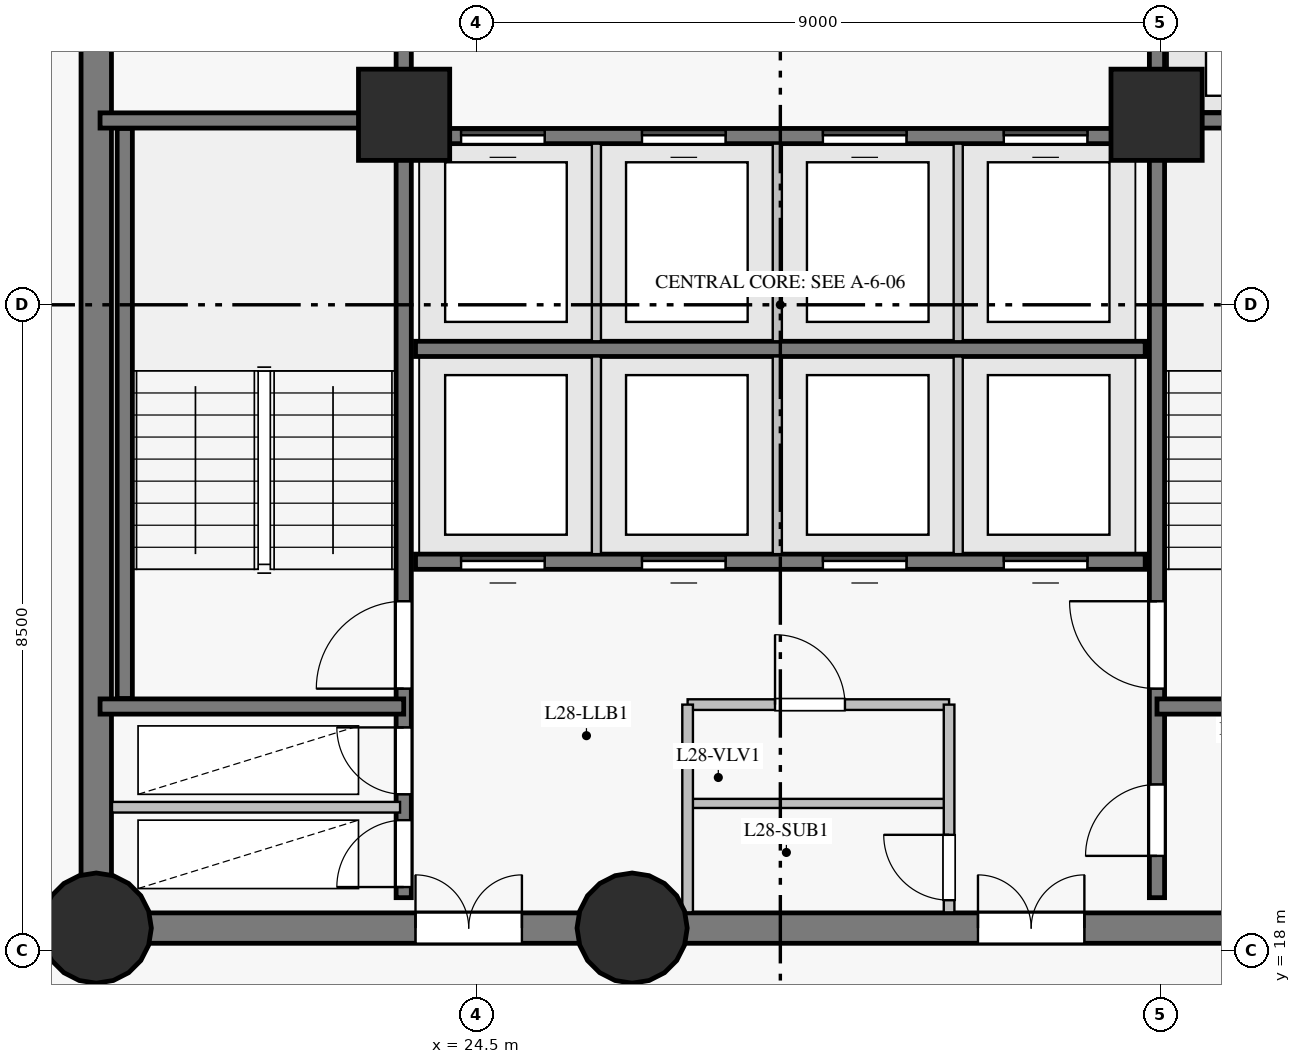
"""IFC4 building model, lengths in metres.
Left out: names, types, materials, properties, quantities, classifications, styles, units other than length and angle.
Written with IfcOpenShell. Run it as: python <this file> out.ifc"""

import sys

from ifc_helpers import new_model, si_unit, direction, frame, frame_2d, origin, origin_with_axes, origin_2d, place, context, subcontext, project, spatial, rectangle, circle, extrude, source, transform, mapped, element, fill, save


model = new_model("IFC4")
c1 = context("Model", 3, precision=1e-05, world=origin(), true_north=direction((0.0, 1.0)))
c2 = subcontext(c1, "Body", "Model", "MODEL_VIEW")
j1 = project(units=[si_unit("LENGTHUNIT", "METRE"), si_unit("PLANEANGLEUNIT", "RADIAN")], contexts=[c1])
p1 = place(None, origin())
s1 = spatial("IfcSite", under=j1, at=p1, CompositionType="ELEMENT")
p2 = place(p1, origin())
s2 = spatial("IfcBuilding", under=s1, at=p2, CompositionType="ELEMENT")
p3 = place(p2, frame((0.0, 0.0, 105.35)))
s3 = spatial("IfcBuildingStorey", under=s2, at=p3, CompositionType="ELEMENT", Elevation=105.35)
p4 = place(p3, frame((19.5, 18.3, 0.0), z_axis=(0.0, 0.0, 1.0), x_axis=(1.0, 0.0, 0.0)))
e1 = element("IfcWall", 1, at=p4, inside=s3, PredefinedType="SHEAR", context=c2, shape_type="SweptSolid", body=[
    extrude(rectangle(XDim=7.05, YDim=0.4, at=frame_2d((3.525, 0.0))), origin(), (0.0, 0.0, 1.0), 2.825),
])
p5 = place(p4, frame((4.2, 0.0, 0.0)))
e2 = element("IfcOpeningElement", 2, at=p5, cuts=e1, PredefinedType="OPENING", context=c2, shape_type="SweptSolid", body=[
    extrude(rectangle(XDim=1.4, YDim=2.2, at=frame_2d((0.7, 1.1))), frame((0.0, 0.21, 0.0), z_axis=(0.0, -1.0, 0.0), x_axis=(1.0, 0.0, 0.0)), (0.0, 0.0, 1.0), 0.42),
])
p6 = place(p3, frame((26.55, 18.3, 0.0), z_axis=(0.0, 0.0, 1.0), x_axis=(1.0, 0.0, 0.0)))
e3 = element("IfcWall", 3, at=p6, inside=s3, PredefinedType="SHEAR", context=c2, shape_type="SweptSolid", body=[
    extrude(rectangle(XDim=10.95, YDim=0.4, at=frame_2d((5.475, 0.0))), origin(), (0.0, 0.0, 1.0), 2.825),
])
p7 = place(p6, frame((4.55, 0.0, 0.0)))
e4 = element("IfcOpeningElement", 4, at=p7, cuts=e3, PredefinedType="OPENING", context=c2, shape_type="SweptSolid", body=[
    extrude(rectangle(XDim=1.4, YDim=2.2, at=frame_2d((0.7, 1.1))), frame((0.0, 0.21, 0.0), z_axis=(0.0, -1.0, 0.0), x_axis=(1.0, 0.0, 0.0)), (0.0, 0.0, 1.0), 0.42),
])
p8 = place(p3, frame((19.5, 34.7, 0.0), z_axis=(0.0, 0.0, 1.0), x_axis=(0.0, -1.0, 0.0)))
e5 = element("IfcWall", 5, at=p8, inside=s3, PredefinedType="SHEAR", context=c2, shape_type="SweptSolid", body=[
    extrude(rectangle(XDim=16.4, YDim=0.4, at=frame_2d((8.2, 0.0))), origin(), (0.0, 0.0, 1.0), 2.825),
])
p9 = place(p8, frame((3.1, 0.0, 0.0)))
e6 = element("IfcOpeningElement", 6, at=p9, cuts=e5, PredefinedType="OPENING", context=c2, shape_type="SweptSolid", body=[
    extrude(rectangle(XDim=1.1, YDim=2.15, at=frame_2d((0.55, 1.075))), frame((0.0, 0.21, 0.0), z_axis=(0.0, -1.0, 0.0), x_axis=(1.0, 0.0, 0.0)), (0.0, 0.0, 1.0), 0.42),
])
m1 = source(origin_with_axes(), c2, "Body", "SweptSolid", [
    extrude(circle(Radius=0.725, at=origin_2d()), origin(), (0.0, 0.0, 1.0), 3.05),
])
for number, where, z_axis, x_axis in (
    (7, (19.5, 18.3, 0.0), (0.0, 0.0, 1.0), (1.0, 0.0, 0.0)),
    (8, (26.55, 18.3, 0.0), (0.0, 0.0, 1.0), (1.0, 0.0, 0.0)),
):
    element("IfcColumn", number, at=place(p3, frame(where, z_axis=z_axis, x_axis=x_axis)), inside=s3, PredefinedType="COLUMN", context=c2, shape_type="MappedRepresentation", body=[
        mapped(m1, transform((0.0, 0.0, 0.0), scale=1.0)),
    ])
m2 = source(origin_with_axes(), c2, "Body", "SweptSolid", [
    extrude(rectangle(XDim=1.2, YDim=1.2, at=origin_2d()), origin(), (0.0, 0.0, 1.0), 3.05),
])
for number, where, z_axis, x_axis in (
    (9, (23.55, 29.0, 0.0), (0.0, 0.0, 1.0), (1.0, 0.0, 0.0)),
    (10, (33.45, 29.0, 0.0), (0.0, 0.0, 1.0), (1.0, 0.0, 0.0)),
):
    element("IfcColumn", number, at=place(p3, frame(where, z_axis=z_axis, x_axis=x_axis)), inside=s3, PredefinedType="COLUMN", context=c2, shape_type="MappedRepresentation", body=[
        mapped(m2, transform((0.0, 0.0, 0.0), scale=1.0)),
    ])
p10 = place(p3, frame((23.545, 18.7, 0.0), z_axis=(0.0, 0.0, 1.0), x_axis=(0.0, 1.0, 0.0)))
e11 = element("IfcWall", 11, at=p10, inside=s3, PredefinedType="SHEAR", context=c2, shape_type="SweptSolid", body=[
    extrude(rectangle(XDim=15.6, YDim=0.2, at=frame_2d((7.8, 0.0))), origin(), (0.0, 0.0, 1.0), 2.825),
])
p11 = place(p10, frame((2.75, 0.0, 0.0)))
e12 = element("IfcOpeningElement", 12, at=p11, cuts=e11, PredefinedType="OPENING", context=c2, shape_type="SweptSolid", body=[
    extrude(rectangle(XDim=1.15, YDim=2.15, at=frame_2d((0.575, 1.075))), frame((0.0, 0.11, 0.0), z_axis=(0.0, -1.0, 0.0), x_axis=(1.0, 0.0, 0.0)), (0.0, 0.0, 1.0), 0.22),
])
p12 = place(p10, frame((0.14, 0.0, 0.0)))
e13 = element("IfcOpeningElement", 13, at=p12, cuts=e11, PredefinedType="OPENING", context=c2, shape_type="SweptSolid", body=[
    extrude(rectangle(XDim=0.88, YDim=2.1, at=frame_2d((0.44, 1.05))), frame((0.0, 0.11, 0.0), z_axis=(0.0, -1.0, 0.0), x_axis=(1.0, 0.0, 0.0)), (0.0, 0.0, 1.0), 0.22),
])
p13 = place(p10, frame((1.36, 0.0, 0.0)))
e14 = element("IfcOpeningElement", 14, at=p13, cuts=e11, PredefinedType="OPENING", context=c2, shape_type="SweptSolid", body=[
    extrude(rectangle(XDim=0.88, YDim=2.1, at=frame_2d((0.44, 1.05))), frame((0.0, 0.11, 0.0), z_axis=(0.0, -1.0, 0.0), x_axis=(1.0, 0.0, 0.0)), (0.0, 0.0, 1.0), 0.22),
])
p14 = place(p10, frame((12.1, 0.0, 0.0)))
e15 = element("IfcOpeningElement", 15, at=p14, cuts=e11, PredefinedType="OPENING", context=c2, shape_type="SweptSolid", body=[
    extrude(rectangle(XDim=1.12, YDim=2.15, at=frame_2d((0.56, 1.075))), frame((0.0, 0.11, 0.0), z_axis=(0.0, -1.0, 0.0), x_axis=(1.0, 0.0, 0.0)), (0.0, 0.0, 1.0), 0.22),
])
p15 = place(p10, frame((14.05, 0.0, 0.0)))
e16 = element("IfcOpeningElement", 16, at=p15, cuts=e11, PredefinedType="OPENING", context=c2, shape_type="SweptSolid", body=[
    extrude(rectangle(XDim=1.12, YDim=2.15, at=frame_2d((0.56, 1.075))), frame((0.0, 0.11, 0.0), z_axis=(0.0, -1.0, 0.0), x_axis=(1.0, 0.0, 0.0)), (0.0, 0.0, 1.0), 0.22),
])
p16 = place(p3, frame((33.455, 18.7, 0.0), z_axis=(0.0, 0.0, 1.0), x_axis=(0.0, 1.0, 0.0)))
e17 = element("IfcWall", 17, at=p16, inside=s3, PredefinedType="SHEAR", context=c2, shape_type="SweptSolid", body=[
    extrude(rectangle(XDim=15.6, YDim=0.2, at=frame_2d((7.8, 0.0))), origin(), (0.0, 0.0, 1.0), 2.825),
])
p17 = place(p16, frame((2.75, 0.0, 0.0)))
e18 = element("IfcOpeningElement", 18, at=p17, cuts=e17, PredefinedType="OPENING", context=c2, shape_type="SweptSolid", body=[
    extrude(rectangle(XDim=1.15, YDim=2.15, at=frame_2d((0.575, 1.075))), frame((0.0, 0.11, 0.0), z_axis=(0.0, -1.0, 0.0), x_axis=(1.0, 0.0, 0.0)), (0.0, 0.0, 1.0), 0.22),
])
p18 = place(p16, frame((0.55, 0.0, 0.0)))
e19 = element("IfcOpeningElement", 19, at=p18, cuts=e17, PredefinedType="OPENING", context=c2, shape_type="SweptSolid", body=[
    extrude(rectangle(XDim=0.94, YDim=2.1, at=frame_2d((0.47, 1.05))), frame((0.0, 0.11, 0.0), z_axis=(0.0, -1.0, 0.0), x_axis=(1.0, 0.0, 0.0)), (0.0, 0.0, 1.0), 0.22),
])
p19 = place(p3, frame((23.7, 23.12, 0.0), z_axis=(0.0, 0.0, 1.0), x_axis=(1.0, 0.0, 0.0)))
e20 = element("IfcWall", 20, at=p19, inside=s3, PredefinedType="SHEAR", context=c2, shape_type="SweptSolid", body=[
    extrude(rectangle(XDim=9.6, YDim=0.2, at=frame_2d((4.8, 0.0))), origin(), (0.0, 0.0, 1.0), 2.825),
])
p20 = place(p19, frame((0.6, 0.0, 0.0)))
e21 = element("IfcOpeningElement", 21, at=p20, cuts=e20, PredefinedType="OPENING", context=c2, shape_type="SweptSolid", body=[
    extrude(rectangle(XDim=1.1, YDim=2.15, at=frame_2d((0.55, 1.075))), frame((0.0, 0.11, 0.0), z_axis=(0.0, -1.0, 0.0), x_axis=(1.0, 0.0, 0.0)), (0.0, 0.0, 1.0), 0.22),
])
p21 = place(p19, frame((2.98, 0.0, 0.0)))
e22 = element("IfcOpeningElement", 22, at=p21, cuts=e20, PredefinedType="OPENING", context=c2, shape_type="SweptSolid", body=[
    extrude(rectangle(XDim=1.1, YDim=2.15, at=frame_2d((0.55, 1.075))), frame((0.0, 0.11, 0.0), z_axis=(0.0, -1.0, 0.0), x_axis=(1.0, 0.0, 0.0)), (0.0, 0.0, 1.0), 0.22),
])
p22 = place(p19, frame((5.36, 0.0, 0.0)))
e23 = element("IfcOpeningElement", 23, at=p22, cuts=e20, PredefinedType="OPENING", context=c2, shape_type="SweptSolid", body=[
    extrude(rectangle(XDim=1.1, YDim=2.15, at=frame_2d((0.55, 1.075))), frame((0.0, 0.11, 0.0), z_axis=(0.0, -1.0, 0.0), x_axis=(1.0, 0.0, 0.0)), (0.0, 0.0, 1.0), 0.22),
])
p23 = place(p19, frame((7.74, 0.0, 0.0)))
e24 = element("IfcOpeningElement", 24, at=p23, cuts=e20, PredefinedType="OPENING", context=c2, shape_type="SweptSolid", body=[
    extrude(rectangle(XDim=1.1, YDim=2.15, at=frame_2d((0.55, 1.075))), frame((0.0, 0.11, 0.0), z_axis=(0.0, -1.0, 0.0), x_axis=(1.0, 0.0, 0.0)), (0.0, 0.0, 1.0), 0.22),
])
p24 = place(p3, frame((23.7, 25.92, 0.0), z_axis=(0.0, 0.0, 1.0), x_axis=(1.0, 0.0, 0.0)))
e25 = element("IfcWall", 25, at=p24, inside=s3, PredefinedType="SHEAR", context=c2, shape_type="SweptSolid", body=[
    extrude(rectangle(XDim=9.6, YDim=0.2, at=frame_2d((4.8, 0.0))), origin(), (0.0, 0.0, 1.0), 2.825),
])
p25 = place(p3, frame((23.7, 28.72, 0.0), z_axis=(0.0, 0.0, 1.0), x_axis=(1.0, 0.0, 0.0)))
e26 = element("IfcWall", 26, at=p25, inside=s3, PredefinedType="SHEAR", context=c2, shape_type="SweptSolid", body=[
    extrude(rectangle(XDim=9.6, YDim=0.2, at=frame_2d((4.8, 0.0))), origin(), (0.0, 0.0, 1.0), 2.825),
])
p26 = place(p25, frame((0.6, 0.0, 0.0)))
e27 = element("IfcOpeningElement", 27, at=p26, cuts=e26, PredefinedType="OPENING", context=c2, shape_type="SweptSolid", body=[
    extrude(rectangle(XDim=1.1, YDim=2.15, at=frame_2d((0.55, 1.075))), frame((0.0, 0.11, 0.0), z_axis=(0.0, -1.0, 0.0), x_axis=(1.0, 0.0, 0.0)), (0.0, 0.0, 1.0), 0.22),
])
p27 = place(p25, frame((2.98, 0.0, 0.0)))
e28 = element("IfcOpeningElement", 28, at=p27, cuts=e26, PredefinedType="OPENING", context=c2, shape_type="SweptSolid", body=[
    extrude(rectangle(XDim=1.1, YDim=2.15, at=frame_2d((0.55, 1.075))), frame((0.0, 0.11, 0.0), z_axis=(0.0, -1.0, 0.0), x_axis=(1.0, 0.0, 0.0)), (0.0, 0.0, 1.0), 0.22),
])
p28 = place(p25, frame((5.36, 0.0, 0.0)))
e29 = element("IfcOpeningElement", 29, at=p28, cuts=e26, PredefinedType="OPENING", context=c2, shape_type="SweptSolid", body=[
    extrude(rectangle(XDim=1.1, YDim=2.15, at=frame_2d((0.55, 1.075))), frame((0.0, 0.11, 0.0), z_axis=(0.0, -1.0, 0.0), x_axis=(1.0, 0.0, 0.0)), (0.0, 0.0, 1.0), 0.22),
])
p29 = place(p25, frame((7.74, 0.0, 0.0)))
e30 = element("IfcOpeningElement", 30, at=p29, cuts=e26, PredefinedType="OPENING", context=c2, shape_type="SweptSolid", body=[
    extrude(rectangle(XDim=1.1, YDim=2.15, at=frame_2d((0.55, 1.075))), frame((0.0, 0.11, 0.0), z_axis=(0.0, -1.0, 0.0), x_axis=(1.0, 0.0, 0.0)), (0.0, 0.0, 1.0), 0.22),
])
p30 = place(p3, frame((19.875, 21.32, 0.0), z_axis=(0.0, 0.0, 1.0), x_axis=(0.0, 1.0, 0.0)))
e31 = element("IfcWall", 31, at=p30, inside=s3, PredefinedType="SHEAR", context=c2, shape_type="SweptSolid", body=[
    extrude(rectangle(XDim=7.5, YDim=0.2, at=frame_2d((3.75, 0.0))), origin(), (0.0, 0.0, 1.0), 2.825),
])
for number, where, z_axis, x_axis in (
    (32, (33.455, 21.215, 0.0), (0.0, 0.0, 1.0), (1.0, 0.0, 0.0)),
    (33, (33.455, 28.925, 0.0), (0.0, 0.0, 1.0), (1.0, 0.0, 0.0)),
    (34, (19.55, 21.215, 0.0), (0.0, 0.0, 1.0), (1.0, 0.0, 0.0)),
    (35, (19.55, 28.925, 0.0), (0.0, 0.0, 1.0), (1.0, 0.0, 0.0)),
):
    element("IfcWall", number, at=place(p3, frame(where, z_axis=z_axis, x_axis=x_axis)), inside=s3, PredefinedType="SHEAR", context=c2, shape_type="SweptSolid", body=[
        extrude(rectangle(XDim=3.995, YDim=0.2, at=frame_2d((1.998, 0.0))), origin(), (0.0, 0.0, 1.0), 2.825),
    ])
p31 = place(p3, frame((19.707, 19.89, 0.0), z_axis=(0.0, 0.0, 1.0), x_axis=(1.0, 0.0, 0.0)))
e36 = element("IfcWall", 36, at=p31, inside=s3, PredefinedType="PARTITIONING", context=c2, shape_type="SweptSolid", body=[
    extrude(rectangle(XDim=3.79, YDim=0.14, at=frame_2d((1.895, 0.0))), origin(), (0.0, 0.0, 1.0), 2.825),
])
p32 = place(p3, frame((27.28, 21.24, 0.0), z_axis=(0.0, 0.0, 1.0), x_axis=(1.0, 0.0, 0.0)))
e37 = element("IfcWall", 37, at=p32, inside=s3, PredefinedType="PARTITIONING", context=c2, shape_type="SweptSolid", body=[
    extrude(rectangle(XDim=3.44, YDim=0.14, at=frame_2d((1.72, 0.0))), origin(), (0.0, 0.0, 1.0), 2.825),
])
p33 = place(p32, frame((1.15, 0.0, 0.0)))
e38 = element("IfcOpeningElement", 38, at=p33, cuts=e37, PredefinedType="OPENING", context=c2, shape_type="SweptSolid", body=[
    extrude(rectangle(XDim=0.92, YDim=2.1, at=frame_2d((0.46, 1.05))), frame((0.0, 0.08, 0.0), z_axis=(0.0, -1.0, 0.0), x_axis=(1.0, 0.0, 0.0)), (0.0, 0.0, 1.0), 0.16),
])
p34 = place(p3, frame((27.28, 19.94, 0.0), z_axis=(0.0, 0.0, 1.0), x_axis=(1.0, 0.0, 0.0)))
e39 = element("IfcWall", 39, at=p34, inside=s3, PredefinedType="PARTITIONING", context=c2, shape_type="SweptSolid", body=[
    extrude(rectangle(XDim=3.44, YDim=0.12, at=frame_2d((1.72, 0.0))), origin(), (0.0, 0.0, 1.0), 2.825),
])
p35 = place(p3, frame((27.28, 18.507, 0.0), z_axis=(0.0, 0.0, 1.0), x_axis=(0.0, 1.0, 0.0)))
e40 = element("IfcWall", 40, at=p35, inside=s3, PredefinedType="PARTITIONING", context=c2, shape_type="SweptSolid", body=[
    extrude(rectangle(XDim=2.733, YDim=0.14, at=frame_2d((1.366, 0.0))), origin(), (0.0, 0.0, 1.0), 2.825),
])
p36 = place(p3, frame((30.72, 18.507, 0.0), z_axis=(0.0, 0.0, 1.0), x_axis=(0.0, 1.0, 0.0)))
e41 = element("IfcWall", 41, at=p36, inside=s3, PredefinedType="PARTITIONING", context=c2, shape_type="SweptSolid", body=[
    extrude(rectangle(XDim=2.733, YDim=0.14, at=frame_2d((1.366, 0.0))), origin(), (0.0, 0.0, 1.0), 2.825),
])
p37 = place(p36, frame((0.16, 0.0, 0.0)))
e42 = element("IfcOpeningElement", 42, at=p37, cuts=e41, PredefinedType="OPENING", context=c2, shape_type="SweptSolid", body=[
    extrude(rectangle(XDim=0.86, YDim=2.1, at=frame_2d((0.43, 1.05))), frame((0.0, 0.08, 0.0), z_axis=(0.0, -1.0, 0.0), x_axis=(1.0, 0.0, 0.0)), (0.0, 0.0, 1.0), 0.16),
])
for number, where, z_axis, x_axis in (
    (43, (26.08, 23.22, 0.0), (0.0, 0.0, 1.0), (0.0, 1.0, 0.0)),
    (44, (28.46, 23.22, 0.0), (0.0, 0.0, 1.0), (0.0, 1.0, 0.0)),
    (45, (30.84, 23.22, 0.0), (0.0, 0.0, 1.0), (0.0, 1.0, 0.0)),
    (46, (26.08, 26.02, 0.0), (0.0, 0.0, 1.0), (0.0, 1.0, 0.0)),
    (47, (28.46, 26.02, 0.0), (0.0, 0.0, 1.0), (0.0, 1.0, 0.0)),
    (48, (30.84, 26.02, 0.0), (0.0, 0.0, 1.0), (0.0, 1.0, 0.0)),
):
    element("IfcWall", number, at=place(p3, frame(where, z_axis=z_axis, x_axis=x_axis)), inside=s3, PredefinedType="PARTITIONING", context=c2, shape_type="SweptSolid", body=[
        extrude(rectangle(XDim=2.6, YDim=0.12, at=frame_2d((1.3, 0.0))), origin(), (0.0, 0.0, 1.0), 2.825),
    ])
m3 = source(origin_with_axes(), c2, "Body", "SweptSolid", [
    extrude(rectangle(XDim=1.15, YDim=2.15, at=frame_2d((0.575, 1.075))), frame((0.0, 0.025, 0.0), z_axis=(0.0, -1.0, 0.0), x_axis=(1.0, 0.0, 0.0)), (0.0, 0.0, 1.0), 0.05),
])
p38 = place(p11, origin())
e49 = element("IfcDoor", 49, at=p38, inside=s3, OperationType="SINGLE_SWING_LEFT", PredefinedType="DOOR", context=c2, shape_type="MappedRepresentation", body=[
    mapped(m3, transform((0.0, 0.0, 0.0), scale=1.0)),
])
fill(e12, e49)
p39 = place(p17, origin())
e50 = element("IfcDoor", 50, at=p39, inside=s3, OperationType="SINGLE_SWING_RIGHT", PredefinedType="DOOR", context=c2, shape_type="MappedRepresentation", body=[
    mapped(m3, transform((0.0, 0.0, 0.0), scale=1.0)),
])
fill(e18, e50)
m4 = source(origin_with_axes(), c2, "Body", "SweptSolid", [
    extrude(rectangle(XDim=0.88, YDim=2.1, at=frame_2d((0.44, 1.05))), frame((0.0, 0.025, 0.0), z_axis=(0.0, -1.0, 0.0), x_axis=(1.0, 0.0, 0.0)), (0.0, 0.0, 1.0), 0.05),
])
p40 = place(p12, origin())
e51 = element("IfcDoor", 51, at=p40, inside=s3, OperationType="SINGLE_SWING_LEFT", PredefinedType="DOOR", context=c2, shape_type="MappedRepresentation", body=[
    mapped(m4, transform((0.0, 0.0, 0.0), scale=1.0)),
])
fill(e13, e51)
p41 = place(p13, origin())
e52 = element("IfcDoor", 52, at=p41, inside=s3, OperationType="SINGLE_SWING_RIGHT", PredefinedType="DOOR", context=c2, shape_type="MappedRepresentation", body=[
    mapped(m4, transform((0.0, 0.0, 0.0), scale=1.0)),
])
fill(e14, e52)
m5 = source(origin_with_axes(), c2, "Body", "SweptSolid", [
    extrude(rectangle(XDim=1.4, YDim=2.2, at=frame_2d((0.7, 1.1))), frame((0.0, 0.025, 0.0), z_axis=(0.0, -1.0, 0.0), x_axis=(1.0, 0.0, 0.0)), (0.0, 0.0, 1.0), 0.05),
])
p42 = place(p5, origin())
e53 = element("IfcDoor", 53, at=p42, inside=s3, OperationType="DOUBLE_DOOR_SINGLE_SWING", PredefinedType="DOOR", context=c2, shape_type="MappedRepresentation", body=[
    mapped(m5, transform((0.0, 0.0, 0.0), scale=1.0)),
])
fill(e2, e53)
p43 = place(p7, origin())
e54 = element("IfcDoor", 54, at=p43, inside=s3, OperationType="DOUBLE_DOOR_SINGLE_SWING", PredefinedType="DOOR", context=c2, shape_type="MappedRepresentation", body=[
    mapped(m5, transform((0.0, 0.0, 0.0), scale=1.0)),
])
fill(e4, e54)
m6 = source(origin_with_axes(), c2, "Body", "SweptSolid", [
    extrude(rectangle(XDim=0.94, YDim=2.1, at=frame_2d((0.47, 1.05))), frame((0.0, 0.025, 0.0), z_axis=(0.0, -1.0, 0.0), x_axis=(1.0, 0.0, 0.0)), (0.0, 0.0, 1.0), 0.05),
])
p44 = place(p18, origin())
e55 = element("IfcDoor", 55, at=p44, inside=s3, OperationType="SINGLE_SWING_LEFT", PredefinedType="DOOR", context=c2, shape_type="MappedRepresentation", body=[
    mapped(m6, transform((0.0, 0.0, 0.0), scale=1.0)),
])
fill(e19, e55)
m7 = source(origin_with_axes(), c2, "Body", "SweptSolid", [
    extrude(rectangle(XDim=0.86, YDim=2.1, at=frame_2d((0.43, 1.05))), frame((0.0, 0.025, 0.0), z_axis=(0.0, -1.0, 0.0), x_axis=(1.0, 0.0, 0.0)), (0.0, 0.0, 1.0), 0.05),
])
p45 = place(p37, origin())
e56 = element("IfcDoor", 56, at=p45, inside=s3, OperationType="SINGLE_SWING_RIGHT", PredefinedType="DOOR", context=c2, shape_type="MappedRepresentation", body=[
    mapped(m7, transform((0.0, 0.0, 0.0), scale=1.0)),
])
fill(e42, e56)
m8 = source(origin_with_axes(), c2, "Body", "SweptSolid", [
    extrude(rectangle(XDim=0.92, YDim=2.1, at=frame_2d((0.46, 1.05))), frame((0.0, 0.025, 0.0), z_axis=(0.0, -1.0, 0.0), x_axis=(1.0, 0.0, 0.0)), (0.0, 0.0, 1.0), 0.05),
])
p46 = place(p33, origin())
e57 = element("IfcDoor", 57, at=p46, inside=s3, OperationType="SINGLE_SWING_LEFT", PredefinedType="DOOR", context=c2, shape_type="MappedRepresentation", body=[
    mapped(m8, transform((0.0, 0.0, 0.0), scale=1.0)),
])
fill(e38, e57)
m9 = source(origin_with_axes(), c2, "Body", "SweptSolid", [
    extrude(rectangle(XDim=1.1, YDim=2.15, at=frame_2d((0.55, 1.075))), frame((0.0, 0.025, 0.0), z_axis=(0.0, -1.0, 0.0), x_axis=(1.0, 0.0, 0.0)), (0.0, 0.0, 1.0), 0.05),
])
p47 = place(p20, origin())
e58 = element("IfcDoor", 58, at=p47, inside=s3, OperationType="SLIDING_TO_LEFT", PredefinedType="DOOR", context=c2, shape_type="MappedRepresentation", body=[
    mapped(m9, transform((0.0, 0.0, 0.0), scale=1.0)),
])
fill(e21, e58)
p48 = place(p21, origin())
e59 = element("IfcDoor", 59, at=p48, inside=s3, OperationType="SLIDING_TO_RIGHT", PredefinedType="DOOR", context=c2, shape_type="MappedRepresentation", body=[
    mapped(m9, transform((0.0, 0.0, 0.0), scale=1.0)),
])
fill(e22, e59)
p49 = place(p22, origin())
e60 = element("IfcDoor", 60, at=p49, inside=s3, OperationType="SLIDING_TO_LEFT", PredefinedType="DOOR", context=c2, shape_type="MappedRepresentation", body=[
    mapped(m9, transform((0.0, 0.0, 0.0), scale=1.0)),
])
fill(e23, e60)
p50 = place(p23, origin())
e61 = element("IfcDoor", 61, at=p50, inside=s3, OperationType="SLIDING_TO_RIGHT", PredefinedType="DOOR", context=c2, shape_type="MappedRepresentation", body=[
    mapped(m9, transform((0.0, 0.0, 0.0), scale=1.0)),
])
fill(e24, e61)
p51 = place(p26, origin())
e62 = element("IfcDoor", 62, at=p51, inside=s3, OperationType="SLIDING_TO_LEFT", PredefinedType="DOOR", context=c2, shape_type="MappedRepresentation", body=[
    mapped(m9, transform((0.0, 0.0, 0.0), scale=1.0)),
])
fill(e27, e62)
p52 = place(p27, origin())
e63 = element("IfcDoor", 63, at=p52, inside=s3, OperationType="SLIDING_TO_RIGHT", PredefinedType="DOOR", context=c2, shape_type="MappedRepresentation", body=[
    mapped(m9, transform((0.0, 0.0, 0.0), scale=1.0)),
])
fill(e28, e63)
p53 = place(p28, origin())
e64 = element("IfcDoor", 64, at=p53, inside=s3, OperationType="SLIDING_TO_LEFT", PredefinedType="DOOR", context=c2, shape_type="MappedRepresentation", body=[
    mapped(m9, transform((0.0, 0.0, 0.0), scale=1.0)),
])
fill(e29, e64)
p54 = place(p29, origin())
e65 = element("IfcDoor", 65, at=p54, inside=s3, OperationType="SLIDING_TO_RIGHT", PredefinedType="DOOR", context=c2, shape_type="MappedRepresentation", body=[
    mapped(m9, transform((0.0, 0.0, 0.0), scale=1.0)),
])
fill(e30, e65)
save(model, sys.argv[1])
